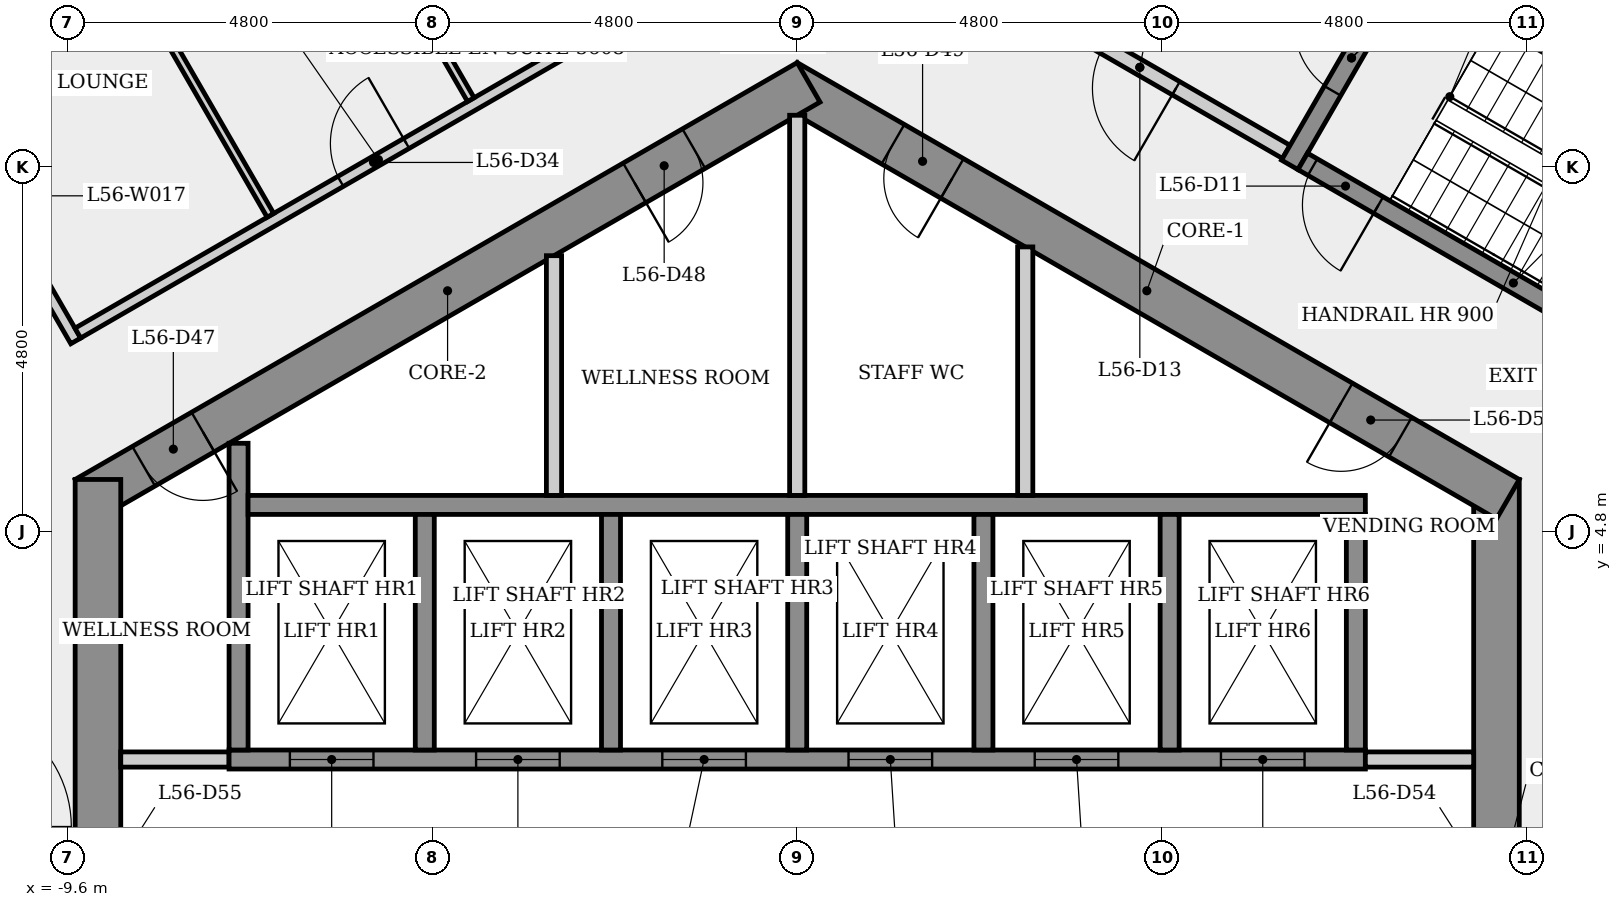
"""IFC4 building model, lengths in metres.
Left out: names, types, materials, properties, quantities, classifications, styles, units other than length and angle.
Written with IfcOpenShell. Run it as: python <this file> out.ifc"""

import sys

from ifc_helpers import new_model, si_unit, direction, frame, frame_2d, origin, place, context, subcontext, project, spatial, rectangle, extrude, element, fill, save


model = new_model("IFC4")
c1 = context("Model", 3, precision=1e-05, world=origin(), true_north=direction((0.0, 1.0)))
c2 = subcontext(c1, "Body", "Model", "MODEL_VIEW")
j1 = project(units=[si_unit("LENGTHUNIT", "METRE"), si_unit("PLANEANGLEUNIT", "RADIAN")], contexts=[c1])
p1 = place(None, origin())
s1 = spatial("IfcSite", under=j1, at=p1, CompositionType="ELEMENT")
p2 = place(p1, origin())
s2 = spatial("IfcBuilding", under=s1, at=p2, CompositionType="ELEMENT")
p3 = place(p2, frame((0.0, 0.0, 210.1)))
s3 = spatial("IfcBuildingStorey", under=s2, at=p3, CompositionType="ELEMENT", Elevation=210.1)
p4 = place(p3, frame((9.2, -5.485, 0.0), z_axis=(0.0, 0.0, 1.0), x_axis=(0.0, 1.0, 0.0)))
e1 = element("IfcWall", 1, at=p4, inside=s3, PredefinedType="SHEAR", context=c2, shape_type="SweptSolid", body=[
    extrude(rectangle(XDim=10.97, YDim=0.6, at=frame_2d((5.485, 0.0))), origin(), (0.0, 0.0, 1.0), 4.0),
])
p5 = place(p4, frame((4.685, 0.0, 0.0)))
e2 = element("IfcOpeningElement", 2, at=p5, cuts=e1, PredefinedType="OPENING", context=c2, shape_type="SweptSolid", body=[
    extrude(rectangle(XDim=1.6, YDim=2.1, at=frame_2d((0.8, 1.05))), frame((0.0, 0.31, 0.0), z_axis=(0.0, -1.0, 0.0), x_axis=(1.0, 0.0, 0.0)), (0.0, 0.0, 1.0), 0.62),
])
p6 = place(p3, frame((9.35, 5.225, 0.0), z_axis=(0.0, 0.0, 1.0), x_axis=(-0.866023993627, 0.500002442456, 0.0)))
e3 = element("IfcWall", 3, at=p6, inside=s3, PredefinedType="SHEAR", context=c2, shape_type="SweptSolid", body=[
    extrude(rectangle(XDim=10.97, YDim=0.6, at=frame_2d((5.485, 0.0))), origin(), (0.0, 0.0, 1.0), 4.0),
])
p7 = place(p6, frame((8.442, 0.0, 0.0)))
e4 = element("IfcOpeningElement", 4, at=p7, cuts=e3, PredefinedType="OPENING", context=c2, shape_type="SweptSolid", body=[
    extrude(rectangle(XDim=0.9, YDim=2.1, at=frame_2d((0.45, 1.05))), frame((0.0, 0.31, 0.0), z_axis=(0.0, -1.0, 0.0), x_axis=(1.0, 0.0, 0.0)), (0.0, 0.0, 1.0), 0.62),
])
p8 = place(p6, frame((1.634, 0.0, 0.0)))
e5 = element("IfcOpeningElement", 5, at=p8, cuts=e3, PredefinedType="OPENING", context=c2, shape_type="SweptSolid", body=[
    extrude(rectangle(XDim=0.9, YDim=2.1, at=frame_2d((0.45, 1.05))), frame((0.0, 0.31, 0.0), z_axis=(0.0, -1.0, 0.0), x_axis=(1.0, 0.0, 0.0)), (0.0, 0.0, 1.0), 0.62),
])
p9 = place(p3, frame((0.15, 10.71, 0.0), z_axis=(0.0, 0.0, 1.0), x_axis=(-0.866023993627, -0.500002442456, 0.0)))
e6 = element("IfcWall", 6, at=p9, inside=s3, PredefinedType="SHEAR", context=c2, shape_type="SweptSolid", body=[
    extrude(rectangle(XDim=10.97, YDim=0.6, at=frame_2d((5.485, 0.0))), origin(), (0.0, 0.0, 1.0), 4.0),
])
p10 = place(p9, frame((9.201, 0.0, 0.0)))
e7 = element("IfcOpeningElement", 7, at=p10, cuts=e6, PredefinedType="OPENING", context=c2, shape_type="SweptSolid", body=[
    extrude(rectangle(XDim=0.9, YDim=2.1, at=frame_2d((0.45, 1.05))), frame((0.0, 0.31, 0.0), z_axis=(0.0, -1.0, 0.0), x_axis=(1.0, 0.0, 0.0)), (0.0, 0.0, 1.0), 0.62),
])
p11 = place(p9, frame((1.744, 0.0, 0.0)))
e8 = element("IfcOpeningElement", 8, at=p11, cuts=e6, PredefinedType="OPENING", context=c2, shape_type="SweptSolid", body=[
    extrude(rectangle(XDim=0.9, YDim=2.1, at=frame_2d((0.45, 1.05))), frame((0.0, 0.31, 0.0), z_axis=(0.0, -1.0, 0.0), x_axis=(1.0, 0.0, 0.0)), (0.0, 0.0, 1.0), 0.62),
])
p12 = place(p3, frame((-9.2, 5.485, 0.0), z_axis=(0.0, 0.0, 1.0), x_axis=(0.0, -1.0, 0.0)))
e9 = element("IfcWall", 9, at=p12, inside=s3, PredefinedType="SHEAR", context=c2, shape_type="SweptSolid", body=[
    extrude(rectangle(XDim=10.97, YDim=0.6, at=frame_2d((5.485, 0.0))), origin(), (0.0, 0.0, 1.0), 4.0),
])
p13 = place(p12, frame((8.516, 0.0, 0.0)))
e10 = element("IfcOpeningElement", 10, at=p13, cuts=e9, PredefinedType="OPENING", context=c2, shape_type="SweptSolid", body=[
    extrude(rectangle(XDim=0.9, YDim=2.1, at=frame_2d((0.45, 1.05))), frame((0.0, 0.31, 0.0), z_axis=(0.0, -1.0, 0.0), x_axis=(1.0, 0.0, 0.0)), (0.0, 0.0, 1.0), 0.62),
])
p14 = place(p12, frame((4.685, 0.0, 0.0)))
e11 = element("IfcOpeningElement", 11, at=p14, cuts=e9, PredefinedType="OPENING", context=c2, shape_type="SweptSolid", body=[
    extrude(rectangle(XDim=1.6, YDim=2.1, at=frame_2d((0.8, 1.05))), frame((0.0, 0.31, 0.0), z_axis=(0.0, -1.0, 0.0), x_axis=(1.0, 0.0, 0.0)), (0.0, 0.0, 1.0), 0.62),
])
p15 = place(p3, frame((-11.697, 11.126, 0.0), z_axis=(0.0, 0.0, 1.0), x_axis=(0.499992488471, -0.866029740524, 0.0)))
e12 = element("IfcWall", 12, at=p15, inside=s3, PredefinedType="PARTITIONING", context=c2, shape_type="SweptSolid", body=[
    extrude(rectangle(XDim=4.409, YDim=0.15, at=frame_2d((2.204, 0.0))), origin(), (0.0, 0.0, 1.0), 3.6),
])
p16 = place(p15, frame((1.667, 0.0, 0.0)))
e13 = element("IfcOpeningElement", 13, at=p16, cuts=e12, PredefinedType="OPENING", context=c2, shape_type="SweptSolid", body=[
    extrude(rectangle(XDim=1.0, YDim=2.1, at=frame_2d((0.5, 1.05))), frame((0.0, 0.085, 0.0), z_axis=(0.0, -1.0, 0.0), x_axis=(1.0, 0.0, 0.0)), (0.0, 0.0, 1.0), 0.17),
])
p17 = place(p3, frame((-9.465, 7.41, 0.0), z_axis=(0.0, 0.0, 1.0), x_axis=(0.866025334581, 0.500000119864, 0.0)))
e14 = element("IfcWall", 14, at=p17, inside=s3, PredefinedType="PARTITIONING", context=c2, shape_type="SweptSolid", body=[
    extrude(rectangle(XDim=9.133, YDim=0.15, at=frame_2d((4.567, 0.0))), origin(), (0.0, 0.0, 1.0), 3.6),
])
p18 = place(p17, frame((3.992, 0.0, 0.0)))
e15 = element("IfcOpeningElement", 15, at=p18, cuts=e14, PredefinedType="OPENING", context=c2, shape_type="SweptSolid", body=[
    extrude(rectangle(XDim=1.0, YDim=2.1, at=frame_2d((0.5, 1.05))), frame((0.0, 0.085, 0.0), z_axis=(0.0, -1.0, 0.0), x_axis=(1.0, 0.0, 0.0)), (0.0, 0.0, 1.0), 0.17),
])
p19 = place(p3, frame((-8.9, 1.8, 0.0), z_axis=(0.0, 0.0, 1.0), x_axis=(1.0, 0.0, 0.0)))
e16 = element("IfcWall", 16, at=p19, inside=s3, PredefinedType="PARTITIONING", context=c2, shape_type="SweptSolid", body=[
    extrude(rectangle(XDim=1.425, YDim=0.2, at=frame_2d((0.712, 0.0))), origin(), (0.0, 0.0, 1.0), 3.6),
])
p20 = place(p3, frame((-7.475, 1.8, 0.0), z_axis=(0.0, 0.0, 1.0), x_axis=(1.0, 0.0, 0.0)))
e17 = element("IfcWall", 17, at=p20, inside=s3, PredefinedType="SHEAR", context=c2, shape_type="SweptSolid", body=[
    extrude(rectangle(XDim=14.95, YDim=0.25, at=frame_2d((7.475, 0.0))), origin(), (0.0, 0.0, 1.0), 3.6),
])
p21 = place(p20, frame((0.8, 0.0, 0.0)))
e18 = element("IfcOpeningElement", 18, at=p21, cuts=e17, PredefinedType="OPENING", context=c2, shape_type="SweptSolid", body=[
    extrude(rectangle(XDim=1.1, YDim=2.1, at=frame_2d((0.55, 1.05))), frame((0.0, 0.135, 0.0), z_axis=(0.0, -1.0, 0.0), x_axis=(1.0, 0.0, 0.0)), (0.0, 0.0, 1.0), 0.27),
])
p22 = place(p20, frame((3.25, 0.0, 0.0)))
e19 = element("IfcOpeningElement", 19, at=p22, cuts=e17, PredefinedType="OPENING", context=c2, shape_type="SweptSolid", body=[
    extrude(rectangle(XDim=1.1, YDim=2.1, at=frame_2d((0.55, 1.05))), frame((0.0, 0.135, 0.0), z_axis=(0.0, -1.0, 0.0), x_axis=(1.0, 0.0, 0.0)), (0.0, 0.0, 1.0), 0.27),
])
p23 = place(p20, frame((5.7, 0.0, 0.0)))
e20 = element("IfcOpeningElement", 20, at=p23, cuts=e17, PredefinedType="OPENING", context=c2, shape_type="SweptSolid", body=[
    extrude(rectangle(XDim=1.1, YDim=2.1, at=frame_2d((0.55, 1.05))), frame((0.0, 0.135, 0.0), z_axis=(0.0, -1.0, 0.0), x_axis=(1.0, 0.0, 0.0)), (0.0, 0.0, 1.0), 0.27),
])
p24 = place(p20, frame((8.15, 0.0, 0.0)))
e21 = element("IfcOpeningElement", 21, at=p24, cuts=e17, PredefinedType="OPENING", context=c2, shape_type="SweptSolid", body=[
    extrude(rectangle(XDim=1.1, YDim=2.1, at=frame_2d((0.55, 1.05))), frame((0.0, 0.135, 0.0), z_axis=(0.0, -1.0, 0.0), x_axis=(1.0, 0.0, 0.0)), (0.0, 0.0, 1.0), 0.27),
])
p25 = place(p20, frame((10.6, 0.0, 0.0)))
e22 = element("IfcOpeningElement", 22, at=p25, cuts=e17, PredefinedType="OPENING", context=c2, shape_type="SweptSolid", body=[
    extrude(rectangle(XDim=1.1, YDim=2.1, at=frame_2d((0.55, 1.05))), frame((0.0, 0.135, 0.0), z_axis=(0.0, -1.0, 0.0), x_axis=(1.0, 0.0, 0.0)), (0.0, 0.0, 1.0), 0.27),
])
p26 = place(p20, frame((13.05, 0.0, 0.0)))
e23 = element("IfcOpeningElement", 23, at=p26, cuts=e17, PredefinedType="OPENING", context=c2, shape_type="SweptSolid", body=[
    extrude(rectangle(XDim=1.1, YDim=2.1, at=frame_2d((0.55, 1.05))), frame((0.0, 0.135, 0.0), z_axis=(0.0, -1.0, 0.0), x_axis=(1.0, 0.0, 0.0)), (0.0, 0.0, 1.0), 0.27),
])
p27 = place(p3, frame((-7.35, 1.925, 0.0), z_axis=(0.0, 0.0, 1.0), x_axis=(0.0, 1.0, 0.0)))
e24 = element("IfcWall", 24, at=p27, inside=s3, PredefinedType="SHEAR", context=c2, shape_type="SweptSolid", body=[
    extrude(rectangle(XDim=4.036, YDim=0.25, at=frame_2d((2.018, 0.0))), origin(), (0.0, 0.0, 1.0), 3.6),
])
p28 = place(p3, frame((-7.225, 5.15, 0.0), z_axis=(0.0, 0.0, 1.0), x_axis=(1.0, 0.0, 0.0)))
e25 = element("IfcWall", 25, at=p28, inside=s3, PredefinedType="SHEAR", context=c2, shape_type="SweptSolid", body=[
    extrude(rectangle(XDim=14.7, YDim=0.25, at=frame_2d((7.35, 0.0))), origin(), (0.0, 0.0, 1.0), 3.6),
])
p29 = place(p3, frame((-6.931, 8.96, 0.0), z_axis=(0.0, 0.0, 1.0), x_axis=(-0.499982511794, 0.866035500369, 0.0)))
e26 = element("IfcWall", 26, at=p29, inside=s3, PredefinedType="PARTITIONING", context=c2, shape_type="SweptSolid", body=[
    extrude(rectangle(XDim=6.962, YDim=0.1, at=frame_2d((3.481, 0.0))), origin(), (0.0, 0.0, 1.0), 3.6),
])
p30 = place(p3, frame((-7.775, 16.511, 0.0), z_axis=(0.0, 0.0, 1.0), x_axis=(0.499997697262, -0.866026733267, 0.0)))
e27 = element("IfcWall", 27, at=p30, inside=s3, PredefinedType="PARTITIONING", context=c2, shape_type="SweptSolid", body=[
    extrude(rectangle(XDim=6.961, YDim=0.1, at=frame_2d((3.481, 0.0))), origin(), (0.0, 0.0, 1.0), 3.6),
])
p31 = place(p3, frame((-4.9, 5.025, 0.0), z_axis=(0.0, 0.0, 1.0), x_axis=(0.0, -1.0, 0.0)))
e28 = element("IfcWall", 28, at=p31, inside=s3, PredefinedType="SHEAR", context=c2, shape_type="SweptSolid", body=[
    extrude(rectangle(XDim=3.1, YDim=0.25, at=frame_2d((1.55, 0.0))), origin(), (0.0, 0.0, 1.0), 4.0),
])
p32 = place(p3, frame((-3.2, 8.429, 0.0), z_axis=(0.0, 0.0, 1.0), x_axis=(0.0, -1.0, 0.0)))
e29 = element("IfcWall", 29, at=p32, inside=s3, PredefinedType="PARTITIONING", context=c2, shape_type="SweptSolid", body=[
    extrude(rectangle(XDim=3.154, YDim=0.2, at=frame_2d((1.577, 0.0))), origin(), (0.0, 0.0, 1.0), 3.6),
])
for number, where, z_axis, x_axis in (
    (30, (-2.45, 5.025, 0.0), (0.0, 0.0, 1.0), (0.0, -1.0, 0.0)),
    (31, (0.0, 5.025, 0.0), (0.0, 0.0, 1.0), (0.0, -1.0, 0.0)),
):
    element("IfcWall", number, at=place(p3, frame(where, z_axis=z_axis, x_axis=x_axis)), inside=s3, PredefinedType="SHEAR", context=c2, shape_type="SweptSolid", body=[
        extrude(rectangle(XDim=3.1, YDim=0.25, at=frame_2d((1.55, 0.0))), origin(), (0.0, 0.0, 1.0), 4.0),
    ])
p33 = place(p3, frame((0.0, 10.277, 0.0), z_axis=(0.0, 0.0, 1.0), x_axis=(0.0, -1.0, 0.0)))
e32 = element("IfcWall", 32, at=p33, inside=s3, PredefinedType="PARTITIONING", context=c2, shape_type="SweptSolid", body=[
    extrude(rectangle(XDim=5.002, YDim=0.2, at=frame_2d((2.501, 0.0))), origin(), (0.0, 0.0, 1.0), 3.6),
])
p34 = place(p3, frame((2.45, 5.025, 0.0), z_axis=(0.0, 0.0, 1.0), x_axis=(0.0, -1.0, 0.0)))
e33 = element("IfcWall", 33, at=p34, inside=s3, PredefinedType="SHEAR", context=c2, shape_type="SweptSolid", body=[
    extrude(rectangle(XDim=3.1, YDim=0.25, at=frame_2d((1.55, 0.0))), origin(), (0.0, 0.0, 1.0), 4.0),
])
p35 = place(p3, frame((3.0, 8.545, 0.0), z_axis=(0.0, 0.0, 1.0), x_axis=(0.0, -1.0, 0.0)))
e34 = element("IfcWall", 34, at=p35, inside=s3, PredefinedType="PARTITIONING", context=c2, shape_type="SweptSolid", body=[
    extrude(rectangle(XDim=3.27, YDim=0.2, at=frame_2d((1.635, 0.0))), origin(), (0.0, 0.0, 1.0), 3.6),
])
p36 = place(p3, frame((4.9, 5.025, 0.0), z_axis=(0.0, 0.0, 1.0), x_axis=(0.0, -1.0, 0.0)))
e35 = element("IfcWall", 35, at=p36, inside=s3, PredefinedType="SHEAR", context=c2, shape_type="SweptSolid", body=[
    extrude(rectangle(XDim=3.1, YDim=0.25, at=frame_2d((1.55, 0.0))), origin(), (0.0, 0.0, 1.0), 4.0),
])
p37 = place(p3, frame((6.435, 9.795, 0.0), z_axis=(0.0, 0.0, 1.0), x_axis=(-0.866012907634, 0.500021643343, 0.0)))
e36 = element("IfcWall", 36, at=p37, inside=s3, PredefinedType="PARTITIONING", context=c2, shape_type="SweptSolid", body=[
    extrude(rectangle(XDim=4.45, YDim=0.2, at=frame_2d((2.225, 0.0))), origin(), (0.0, 0.0, 1.0), 3.6),
])
p38 = place(p37, frame((1.675, 0.0, 0.0)))
e37 = element("IfcOpeningElement", 37, at=p38, cuts=e36, PredefinedType="OPENING", context=c2, shape_type="SweptSolid", body=[
    extrude(rectangle(XDim=1.1, YDim=2.1, at=frame_2d((0.55, 1.05))), frame((0.0, 0.11, 0.0), z_axis=(0.0, -1.0, 0.0), x_axis=(1.0, 0.0, 0.0)), (0.0, 0.0, 1.0), 0.22),
])
p39 = place(p3, frame((6.48, 9.624, 0.0), z_axis=(0.0, 0.0, 1.0), x_axis=(0.500017246033, 0.866015446554, 0.0)))
e38 = element("IfcWall", 38, at=p39, inside=s3, PredefinedType="SHEAR", context=c2, shape_type="SweptSolid", body=[
    extrude(rectangle(XDim=3.25, YDim=0.25, at=frame_2d((1.625, 0.0))), origin(), (0.0, 0.0, 1.0), 3.6),
])
p40 = place(p39, frame((1.125, 0.0, 0.0)))
e39 = element("IfcOpeningElement", 39, at=p40, cuts=e38, PredefinedType="OPENING", context=c2, shape_type="SweptSolid", body=[
    extrude(rectangle(XDim=1.0, YDim=2.1, at=frame_2d((0.5, 1.05))), frame((0.0, 0.135, 0.0), z_axis=(0.0, -1.0, 0.0), x_axis=(1.0, 0.0, 0.0)), (0.0, 0.0, 1.0), 0.27),
])
p41 = place(p3, frame((7.475, 1.8, 0.0), z_axis=(0.0, 0.0, 1.0), x_axis=(1.0, 0.0, 0.0)))
e40 = element("IfcWall", 40, at=p41, inside=s3, PredefinedType="PARTITIONING", context=c2, shape_type="SweptSolid", body=[
    extrude(rectangle(XDim=1.425, YDim=0.2, at=frame_2d((0.712, 0.0))), origin(), (0.0, 0.0, 1.0), 3.6),
])
p42 = place(p3, frame((7.35, 5.025, 0.0), z_axis=(0.0, 0.0, 1.0), x_axis=(0.0, -1.0, 0.0)))
e41 = element("IfcWall", 41, at=p42, inside=s3, PredefinedType="SHEAR", context=c2, shape_type="SweptSolid", body=[
    extrude(rectangle(XDim=3.1, YDim=0.25, at=frame_2d((1.55, 0.0))), origin(), (0.0, 0.0, 1.0), 4.0),
])
p43 = place(p3, frame((8.151, 12.268, 0.0), z_axis=(0.0, 0.0, 1.0), x_axis=(0.866025499775, -0.499999833739, 0.0)))
e42 = element("IfcWall", 42, at=p43, inside=s3, PredefinedType="SHEAR", context=c2, shape_type="SweptSolid", body=[
    extrude(rectangle(XDim=6.4, YDim=0.25, at=frame_2d((3.2, 0.0))), origin(), (0.0, 0.0, 1.0), 3.6),
])
p44 = place(p3, frame((12.194, 6.47, 0.0), z_axis=(0.0, 0.0, 1.0), x_axis=(-0.866025499775, 0.499999833739, 0.0)))
e43 = element("IfcWall", 43, at=p44, inside=s3, PredefinedType="SHEAR", context=c2, shape_type="SweptSolid", body=[
    extrude(rectangle(XDim=6.4, YDim=0.25, at=frame_2d((3.2, 0.0))), origin(), (0.0, 0.0, 1.0), 3.6),
])
p45 = place(p44, frame((5.25, 0.0, 0.0)))
e44 = element("IfcOpeningElement", 44, at=p45, cuts=e43, PredefinedType="OPENING", context=c2, shape_type="SweptSolid", body=[
    extrude(rectangle(XDim=1.0, YDim=2.1, at=frame_2d((0.5, 1.05))), frame((0.0, 0.135, 0.0), z_axis=(0.0, -1.0, 0.0), x_axis=(1.0, 0.0, 0.0)), (0.0, 0.0, 1.0), 0.27),
])
p46 = place(p21, origin())
e45 = element("IfcDoor", 45, at=p46, inside=s3, OperationType="SLIDING_TO_LEFT", PredefinedType="DOOR", context=c2, shape_type="SweptSolid", body=[
    extrude(rectangle(XDim=1.1, YDim=2.1, at=frame_2d((0.55, 1.05))), frame((0.0, 0.025, 0.0), z_axis=(0.0, -1.0, 0.0), x_axis=(1.0, 0.0, 0.0)), (0.0, 0.0, 1.0), 0.05),
])
fill(e18, e45)
p47 = place(p22, origin())
e46 = element("IfcDoor", 46, at=p47, inside=s3, OperationType="SLIDING_TO_LEFT", PredefinedType="DOOR", context=c2, shape_type="SweptSolid", body=[
    extrude(rectangle(XDim=1.1, YDim=2.1, at=frame_2d((0.55, 1.05))), frame((0.0, 0.025, 0.0), z_axis=(0.0, -1.0, 0.0), x_axis=(1.0, 0.0, 0.0)), (0.0, 0.0, 1.0), 0.05),
])
fill(e19, e46)
p48 = place(p23, origin())
e47 = element("IfcDoor", 47, at=p48, inside=s3, OperationType="SLIDING_TO_LEFT", PredefinedType="DOOR", context=c2, shape_type="SweptSolid", body=[
    extrude(rectangle(XDim=1.1, YDim=2.1, at=frame_2d((0.55, 1.05))), frame((0.0, 0.025, 0.0), z_axis=(0.0, -1.0, 0.0), x_axis=(1.0, 0.0, 0.0)), (0.0, 0.0, 1.0), 0.05),
])
fill(e20, e47)
p49 = place(p24, origin())
e48 = element("IfcDoor", 48, at=p49, inside=s3, OperationType="SLIDING_TO_LEFT", PredefinedType="DOOR", context=c2, shape_type="SweptSolid", body=[
    extrude(rectangle(XDim=1.1, YDim=2.1, at=frame_2d((0.55, 1.05))), frame((0.0, 0.025, 0.0), z_axis=(0.0, -1.0, 0.0), x_axis=(1.0, 0.0, 0.0)), (0.0, 0.0, 1.0), 0.05),
])
fill(e21, e48)
p50 = place(p25, origin())
e49 = element("IfcDoor", 49, at=p50, inside=s3, OperationType="SLIDING_TO_LEFT", PredefinedType="DOOR", context=c2, shape_type="SweptSolid", body=[
    extrude(rectangle(XDim=1.1, YDim=2.1, at=frame_2d((0.55, 1.05))), frame((0.0, 0.025, 0.0), z_axis=(0.0, -1.0, 0.0), x_axis=(1.0, 0.0, 0.0)), (0.0, 0.0, 1.0), 0.05),
])
fill(e22, e49)
p51 = place(p26, origin())
e50 = element("IfcDoor", 50, at=p51, inside=s3, OperationType="SLIDING_TO_LEFT", PredefinedType="DOOR", context=c2, shape_type="SweptSolid", body=[
    extrude(rectangle(XDim=1.1, YDim=2.1, at=frame_2d((0.55, 1.05))), frame((0.0, 0.025, 0.0), z_axis=(0.0, -1.0, 0.0), x_axis=(1.0, 0.0, 0.0)), (0.0, 0.0, 1.0), 0.05),
])
fill(e23, e50)
p52 = place(p45, origin())
e51 = element("IfcDoor", 51, at=p52, inside=s3, OperationType="SINGLE_SWING_LEFT", PredefinedType="DOOR", context=c2, shape_type="SweptSolid", body=[
    extrude(rectangle(XDim=1.0, YDim=2.1, at=frame_2d((0.5, 1.05))), frame((0.0, 0.025, 0.0), z_axis=(0.0, -1.0, 0.0), x_axis=(1.0, 0.0, 0.0)), (0.0, 0.0, 1.0), 0.05),
])
fill(e44, e51)
p53 = place(p40, origin())
e52 = element("IfcDoor", 52, at=p53, inside=s3, OperationType="SINGLE_SWING_RIGHT", PredefinedType="DOOR", context=c2, shape_type="SweptSolid", body=[
    extrude(rectangle(XDim=1.0, YDim=2.1, at=frame_2d((0.5, 1.05))), frame((0.0, 0.025, 0.0), z_axis=(0.0, -1.0, 0.0), x_axis=(1.0, 0.0, 0.0)), (0.0, 0.0, 1.0), 0.05),
])
fill(e39, e52)
p54 = place(p38, origin())
e53 = element("IfcDoor", 53, at=p54, inside=s3, OperationType="SINGLE_SWING_LEFT", PredefinedType="DOOR", context=c2, shape_type="SweptSolid", body=[
    extrude(rectangle(XDim=1.1, YDim=2.1, at=frame_2d((0.55, 1.05))), frame((0.0, 0.025, 0.0), z_axis=(0.0, -1.0, 0.0), x_axis=(1.0, 0.0, 0.0)), (0.0, 0.0, 1.0), 0.05),
])
fill(e37, e53)
p55 = place(p18, origin())
e54 = element("IfcDoor", 54, at=p55, inside=s3, OperationType="SINGLE_SWING_RIGHT", PredefinedType="DOOR", context=c2, shape_type="SweptSolid", body=[
    extrude(rectangle(XDim=1.0, YDim=2.1, at=frame_2d((0.5, 1.05))), frame((0.0, 0.025, 0.0), z_axis=(0.0, -1.0, 0.0), x_axis=(1.0, 0.0, 0.0)), (0.0, 0.0, 1.0), 0.05),
])
fill(e15, e54)
p56 = place(p10, origin())
e55 = element("IfcDoor", 55, at=p56, inside=s3, OperationType="SINGLE_SWING_LEFT", PredefinedType="DOOR", context=c2, shape_type="SweptSolid", body=[
    extrude(rectangle(XDim=0.9, YDim=2.1, at=frame_2d((0.45, 1.05))), frame((0.0, 0.025, 0.0), z_axis=(0.0, -1.0, 0.0), x_axis=(1.0, 0.0, 0.0)), (0.0, 0.0, 1.0), 0.05),
])
fill(e7, e55)
p57 = place(p11, origin())
e56 = element("IfcDoor", 56, at=p57, inside=s3, OperationType="SINGLE_SWING_RIGHT", PredefinedType="DOOR", context=c2, shape_type="SweptSolid", body=[
    extrude(rectangle(XDim=0.9, YDim=2.1, at=frame_2d((0.45, 1.05))), frame((0.0, 0.025, 0.0), z_axis=(0.0, -1.0, 0.0), x_axis=(1.0, 0.0, 0.0)), (0.0, 0.0, 1.0), 0.05),
])
fill(e8, e56)
p58 = place(p7, origin())
e57 = element("IfcDoor", 57, at=p58, inside=s3, OperationType="SINGLE_SWING_LEFT", PredefinedType="DOOR", context=c2, shape_type="SweptSolid", body=[
    extrude(rectangle(XDim=0.9, YDim=2.1, at=frame_2d((0.45, 1.05))), frame((0.0, 0.025, 0.0), z_axis=(0.0, -1.0, 0.0), x_axis=(1.0, 0.0, 0.0)), (0.0, 0.0, 1.0), 0.05),
])
fill(e4, e57)
p59 = place(p8, origin())
e58 = element("IfcDoor", 58, at=p59, inside=s3, OperationType="SINGLE_SWING_RIGHT", PredefinedType="DOOR", context=c2, shape_type="SweptSolid", body=[
    extrude(rectangle(XDim=0.9, YDim=2.1, at=frame_2d((0.45, 1.05))), frame((0.0, 0.025, 0.0), z_axis=(0.0, -1.0, 0.0), x_axis=(1.0, 0.0, 0.0)), (0.0, 0.0, 1.0), 0.05),
])
fill(e5, e58)
save(model, sys.argv[1])
